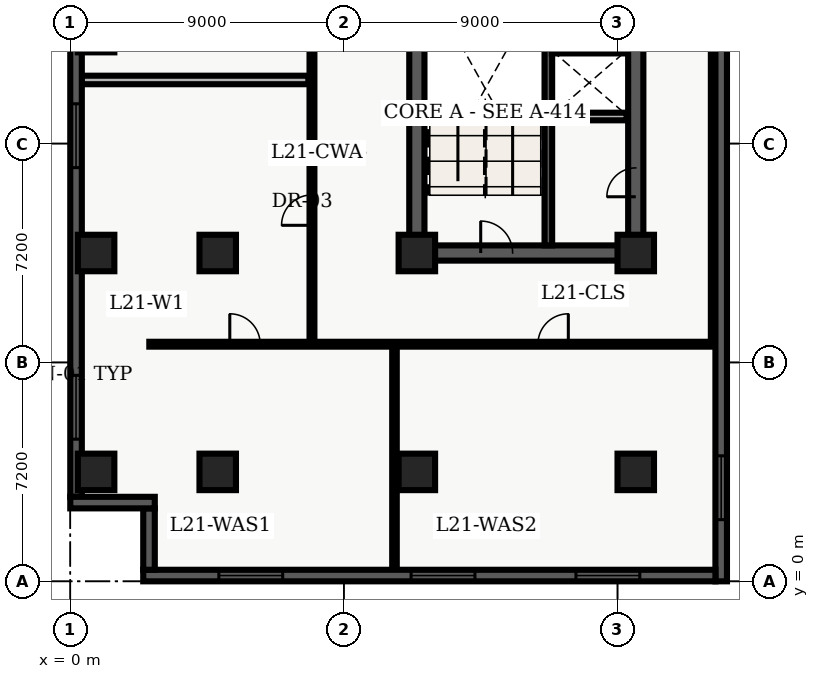
"""IFC4 building model, lengths in metres.
Left out: names, types, materials, properties, quantities, classifications, styles, units other than length and angle.
Written with IfcOpenShell. Run it as: python <this file> out.ifc"""

import sys

from ifc_helpers import new_model, entity, si_unit, converted_unit, direction, frame, origin_with_axes, origin_2d_with_axis, place, context, subcontext, project, spatial, polyline, rectangle, outline, extrude, element, fill, save


model = new_model("IFC4")
c1 = context("Model", 3, precision=1e-05, world=origin_with_axes(), true_north=direction((0.0, 1.0)))
c2 = subcontext(c1, "Body", "Model", "MODEL_VIEW")
j1 = project(units=[si_unit("LENGTHUNIT", "METRE"), converted_unit("PLANEANGLEUNIT", "DEGREE", entity("IfcPlaneAngleMeasure", 0.017), si_unit("PLANEANGLEUNIT", "RADIAN"), dimensions=[0, 0, 0, 0, 0, 0, 0])], contexts=[c1])
p1 = place(None, origin_with_axes())
s1 = spatial("IfcSite", under=j1, at=p1, CompositionType="ELEMENT")
p2 = place(p1, origin_with_axes())
s2 = spatial("IfcBuilding", under=s1, at=p2, CompositionType="ELEMENT")
p3 = place(p2, frame((0.0, 0.0, 89.1), z_axis=(0.0, 0.0, 1.0), x_axis=(1.0, 0.0, 0.0)))
s3 = spatial("IfcBuildingStorey", under=s2, at=p3, CompositionType="ELEMENT", Elevation=89.1)
p4 = place(p3, frame((11.4, 10.8, 0.0), z_axis=(0.0, 0.0, 1.0), x_axis=(0.0, 1.0, 0.0)))
e1 = element("IfcWall", 1, at=p4, inside=s3, PredefinedType="SHEAR", context=c2, shape_type="SweptSolid", body=[
    extrude(outline(polyline([(0.0, -0.25), (27.0, -0.25), (27.0, 0.25), (0.0, 0.25), (0.0, -0.25)])), origin_with_axes(), (0.0, 0.0, 1.0), 3.66),
])
p5 = place(p3, frame((11.4, 10.8, 0.0), z_axis=(0.0, 0.0, 1.0), x_axis=(1.0, 0.0, 0.0)))
e2 = element("IfcWall", 2, at=p5, inside=s3, PredefinedType="SHEAR", context=c2, shape_type="SweptSolid", body=[
    extrude(outline(polyline([(0.0, -0.25), (7.2, -0.25), (7.2, 0.25), (0.0, 0.25), (0.0, -0.25)])), origin_with_axes(), (0.0, 0.0, 1.0), 3.66),
])
p6 = place(p5, frame((2.625, 0.0, 0.0), z_axis=(0.0, 0.0, 1.0), x_axis=(1.0, 0.0, 0.0)))
e3 = element("IfcOpeningElement", 3, at=p6, cuts=e2, PredefinedType="OPENING", context=c2, shape_type="SweptSolid", body=[
    extrude(rectangle(XDim=1.05, YDim=0.52, at=origin_2d_with_axis()), origin_with_axes(), (0.0, 0.0, 1.0), 2.15),
])
p7 = place(p3, frame((18.6, 10.8, 0.0), z_axis=(0.0, 0.0, 1.0), x_axis=(0.0, 1.0, 0.0)))
e4 = element("IfcWall", 4, at=p7, inside=s3, PredefinedType="SHEAR", context=c2, shape_type="SweptSolid", body=[
    extrude(outline(polyline([(0.0, -0.25), (13.5, -0.25), (13.5, 0.25), (0.0, 0.25), (0.0, -0.25)])), origin_with_axes(), (0.0, 0.0, 1.0), 3.66),
])
p8 = place(p7, frame((11.125, 0.0, 0.0), z_axis=(0.0, 0.0, 1.0), x_axis=(1.0, 0.0, 0.0)))
e5 = element("IfcOpeningElement", 5, at=p8, cuts=e4, PredefinedType="OPENING", context=c2, shape_type="SweptSolid", body=[
    extrude(rectangle(XDim=1.05, YDim=0.52, at=origin_2d_with_axis()), origin_with_axes(), (0.0, 0.0, 1.0), 2.15),
])
p9 = place(p7, frame((2.325, 0.0, 0.0), z_axis=(0.0, 0.0, 1.0), x_axis=(1.0, 0.0, 0.0)))
e6 = element("IfcOpeningElement", 6, at=p9, cuts=e4, PredefinedType="OPENING", context=c2, shape_type="SweptSolid", body=[
    extrude(rectangle(XDim=0.95, YDim=0.52, at=origin_2d_with_axis()), origin_with_axes(), (0.0, 0.0, 1.0), 2.15),
])
p10 = place(p3, frame((15.725, 11.05, 0.0), z_axis=(0.0, 0.0, 1.0), x_axis=(0.0, 1.0, 0.0)))
e7 = element("IfcWall", 7, at=p10, inside=s3, PredefinedType="SHEAR", context=c2, shape_type="SweptSolid", body=[
    extrude(outline(polyline([(0.0, -0.125), (8.65, -0.125), (8.65, 0.125), (0.0, 0.125), (0.0, -0.125)])), origin_with_axes(), (0.0, 0.0, 1.0), 3.66),
])
for number, where, z_axis, x_axis in (
    (8, (11.4, 3.6, 0.0), (0.0, 0.0, 1.0), (1.0, 0.0, 0.0)),
    (9, (11.4, 10.8, 0.0), (0.0, 0.0, 1.0), (1.0, 0.0, 0.0)),
    (10, (18.6, 3.6, 0.0), (0.0, 0.0, 1.0), (1.0, 0.0, 0.0)),
    (11, (18.6, 10.8, 0.0), (0.0, 0.0, 1.0), (1.0, 0.0, 0.0)),
    (12, (4.85, 3.6, 0.0), (0.0, 0.0, 1.0), (1.0, 0.0, 0.0)),
    (13, (4.85, 10.8, 0.0), (0.0, 0.0, 1.0), (1.0, 0.0, 0.0)),
    (14, (0.85, 3.6, 0.0), (0.0, 0.0, 1.0), (1.0, 0.0, 0.0)),
    (15, (0.85, 10.8, 0.0), (0.0, 0.0, 1.0), (1.0, 0.0, 0.0)),
    (16, (0.85, 18.0, 0.0), (0.0, 0.0, 1.0), (1.0, 0.0, 0.0)),
):
    element("IfcColumn", number, at=place(p3, frame(where, z_axis=z_axis, x_axis=x_axis)), inside=s3, PredefinedType="COLUMN", context=c2, shape_type="SweptSolid", body=[
        extrude(rectangle(XDim=1.2, YDim=1.2, at=origin_2d_with_axis()), origin_with_axes(), (0.0, 0.0, 1.0), 3.9),
    ])
for number, where, z_axis, x_axis in (
    (17, (15.84, 15.29, 0.0), (0.0, 0.0, 1.0), (1.0, 0.0, 0.0)),
    (18, (15.84, 17.49, 0.0), (0.0, 0.0, 1.0), (1.0, 0.0, 0.0)),
):
    element("IfcWall", number, at=place(p3, frame(where, z_axis=z_axis, x_axis=x_axis)), inside=s3, PredefinedType="SOLIDWALL", context=c2, shape_type="SweptSolid", body=[
        extrude(outline(polyline([(0.0, -0.125), (2.46, -0.125), (2.46, 0.125), (0.0, 0.125), (0.0, -0.125)])), origin_with_axes(), (0.0, 0.0, 1.0), 2.7),
    ])
p11 = place(p3, frame((2.6, 7.8, 0.0), z_axis=(0.0, 0.0, 1.0), x_axis=(1.0, 0.0, 0.0)))
e19 = element("IfcWall", 19, at=p11, inside=s3, PredefinedType="PARTITIONING", context=c2, shape_type="SweptSolid", body=[
    extrude(outline(polyline([(0.0, -0.08), (18.625, -0.08), (18.625, 0.08), (0.0, 0.08), (0.0, -0.08)])), origin_with_axes(), (0.0, 0.0, 1.0), 2.7),
])
p12 = place(p11, frame((3.147, 0.0, 0.0), z_axis=(0.0, 0.0, 1.0), x_axis=(1.0, 0.0, 0.0)))
e20 = element("IfcOpeningElement", 20, at=p12, cuts=e19, PredefinedType="OPENING", context=c2, shape_type="SweptSolid", body=[
    extrude(rectangle(XDim=1.0, YDim=0.18, at=origin_2d_with_axis()), origin_with_axes(), (0.0, 0.0, 1.0), 2.15),
])
p13 = place(p11, frame((13.282, 0.0, 0.0), z_axis=(0.0, 0.0, 1.0), x_axis=(1.0, 0.0, 0.0)))
e21 = element("IfcOpeningElement", 21, at=p13, cuts=e19, PredefinedType="OPENING", context=c2, shape_type="SweptSolid", body=[
    extrude(rectangle(XDim=1.0, YDim=0.18, at=origin_2d_with_axis()), origin_with_axes(), (0.0, 0.0, 1.0), 2.15),
])
p14 = place(p3, frame((21.15, 7.8, 0.0), z_axis=(0.0, 0.0, 1.0), x_axis=(0.0, 1.0, 0.0)))
e22 = element("IfcWall", 22, at=p14, inside=s3, PredefinedType="PARTITIONING", context=c2, shape_type="SweptSolid", body=[
    extrude(outline(polyline([(0.0, -0.08), (32.7, -0.08), (32.7, 0.08), (0.0, 0.08), (0.0, -0.08)])), origin_with_axes(), (0.0, 0.0, 1.0), 2.7),
])
p15 = place(p3, frame((7.95, 7.8, 0.0), z_axis=(0.0, 0.0, 1.0), x_axis=(0.0, 1.0, 0.0)))
e23 = element("IfcWall", 23, at=p15, inside=s3, PredefinedType="PARTITIONING", context=c2, shape_type="SweptSolid", body=[
    extrude(outline(polyline([(0.0, -0.08), (32.7, -0.08), (32.7, 0.08), (0.0, 0.08), (0.0, -0.08)])), origin_with_axes(), (0.0, 0.0, 1.0), 2.7),
])
p16 = place(p15, frame((4.411, 0.0, 0.0), z_axis=(0.0, 0.0, 1.0), x_axis=(1.0, 0.0, 0.0)))
e24 = element("IfcOpeningElement", 24, at=p16, cuts=e23, PredefinedType="OPENING", context=c2, shape_type="SweptSolid", body=[
    extrude(rectangle(XDim=1.0, YDim=0.18, at=origin_2d_with_axis()), origin_with_axes(), (0.0, 0.0, 1.0), 2.15),
])
p17 = place(p15, frame((14.06, 0.0, 0.0), z_axis=(0.0, 0.0, 1.0), x_axis=(1.0, 0.0, 0.0)))
e25 = element("IfcOpeningElement", 25, at=p17, cuts=e23, PredefinedType="OPENING", context=c2, shape_type="SweptSolid", body=[
    extrude(rectangle(XDim=1.0, YDim=0.18, at=origin_2d_with_axis()), origin_with_axes(), (0.0, 0.0, 1.0), 2.15),
])
p18 = place(p15, frame((26.0, 0.0, 0.0), z_axis=(0.0, 0.0, 1.0), x_axis=(1.0, 0.0, 0.0)))
e26 = element("IfcOpeningElement", 26, at=p18, cuts=e23, PredefinedType="OPENING", context=c2, shape_type="SweptSolid", body=[
    extrude(rectangle(XDim=1.0, YDim=0.18, at=origin_2d_with_axis()), origin_with_axes(), (0.0, 0.0, 1.0), 2.15),
])
p19 = place(p3, frame((0.375, 16.492, 0.0), z_axis=(0.0, 0.0, 1.0), x_axis=(1.0, 0.0, 0.0)))
e27 = element("IfcWall", 27, at=p19, inside=s3, PredefinedType="PARTITIONING", context=c2, shape_type="SweptSolid", body=[
    extrude(outline(polyline([(0.0, -0.14), (7.455, -0.14), (7.455, 0.14), (0.0, 0.14), (0.0, -0.14)])), origin_with_axes(), (0.0, 0.0, 1.0), 2.7),
])
p20 = place(p3, frame((10.664, 0.36, 0.0), z_axis=(0.0, 0.0, 1.0), x_axis=(0.0, 1.0, 0.0)))
e28 = element("IfcWall", 28, at=p20, inside=s3, PredefinedType="PARTITIONING", context=c2, shape_type="SweptSolid", body=[
    extrude(outline(polyline([(0.0, -0.075), (7.34, -0.075), (7.34, 0.075), (0.0, 0.075), (0.0, -0.075)])), origin_with_axes(), (0.0, 0.0, 1.0), 2.7),
])
p21 = place(p3, frame((0.19, 2.78, 0.0), z_axis=(0.0, 0.0, 1.0), x_axis=(0.0, 1.0, 0.0)))
e29 = element("IfcWall", 29, at=p21, inside=s3, PredefinedType="SOLIDWALL", context=c2, shape_type="SweptSolid", body=[
    extrude(outline(polyline([(0.0, -0.19), (43.42, -0.19), (43.42, 0.19), (0.0, 0.19), (0.0, -0.19)])), origin_with_axes(), (0.0, 0.0, 1.0), 3.66),
])
p22 = place(p21, frame((2.946, 0.0, 0.45), z_axis=(0.0, 0.0, 1.0), x_axis=(1.0, 0.0, 0.0)))
e30 = element("IfcOpeningElement", 30, at=p22, cuts=e29, PredefinedType="OPENING", context=c2, shape_type="SweptSolid", body=[
    extrude(rectangle(XDim=2.1, YDim=0.4, at=origin_2d_with_axis()), origin_with_axes(), (0.0, 0.0, 1.0), 2.2),
])
p23 = place(p21, frame((11.878, 0.0, 0.45), z_axis=(0.0, 0.0, 1.0), x_axis=(1.0, 0.0, 0.0)))
e31 = element("IfcOpeningElement", 31, at=p23, cuts=e29, PredefinedType="OPENING", context=c2, shape_type="SweptSolid", body=[
    extrude(rectangle(XDim=2.1, YDim=0.4, at=origin_2d_with_axis()), origin_with_axes(), (0.0, 0.0, 1.0), 2.2),
])
p24 = place(p21, frame((17.469, 0.0, 0.45), z_axis=(0.0, 0.0, 1.0), x_axis=(1.0, 0.0, 0.0)))
e32 = element("IfcOpeningElement", 32, at=p24, cuts=e29, PredefinedType="OPENING", context=c2, shape_type="SweptSolid", body=[
    extrude(rectangle(XDim=2.1, YDim=0.4, at=origin_2d_with_axis()), origin_with_axes(), (0.0, 0.0, 1.0), 2.2),
])
p25 = place(p21, frame((21.71, 0.0, 0.45), z_axis=(0.0, 0.0, 1.0), x_axis=(1.0, 0.0, 0.0)))
e33 = element("IfcOpeningElement", 33, at=p25, cuts=e29, PredefinedType="OPENING", context=c2, shape_type="SweptSolid", body=[
    extrude(rectangle(XDim=2.1, YDim=0.4, at=origin_2d_with_axis()), origin_with_axes(), (0.0, 0.0, 1.0), 2.2),
])
p26 = place(p21, frame((26.401, 0.0, 0.45), z_axis=(0.0, 0.0, 1.0), x_axis=(1.0, 0.0, 0.0)))
e34 = element("IfcOpeningElement", 34, at=p26, cuts=e29, PredefinedType="OPENING", context=c2, shape_type="SweptSolid", body=[
    extrude(rectangle(XDim=2.1, YDim=0.4, at=origin_2d_with_axis()), origin_with_axes(), (0.0, 0.0, 1.0), 2.2),
])
p27 = place(p21, frame((31.092, 0.0, 0.45), z_axis=(0.0, 0.0, 1.0), x_axis=(1.0, 0.0, 0.0)))
e35 = element("IfcOpeningElement", 35, at=p27, cuts=e29, PredefinedType="OPENING", context=c2, shape_type="SweptSolid", body=[
    extrude(rectangle(XDim=2.1, YDim=0.4, at=origin_2d_with_axis()), origin_with_axes(), (0.0, 0.0, 1.0), 2.2),
])
p28 = place(p21, frame((40.024, 0.0, 0.45), z_axis=(0.0, 0.0, 1.0), x_axis=(1.0, 0.0, 0.0)))
e36 = element("IfcOpeningElement", 36, at=p28, cuts=e29, PredefinedType="OPENING", context=c2, shape_type="SweptSolid", body=[
    extrude(rectangle(XDim=2.1, YDim=0.4, at=origin_2d_with_axis()), origin_with_axes(), (0.0, 0.0, 1.0), 2.2),
])
p29 = place(p3, frame((21.41, 45.82, 0.0), z_axis=(0.0, 0.0, 1.0), x_axis=(0.0, -1.0, 0.0)))
e37 = element("IfcWall", 37, at=p29, inside=s3, PredefinedType="SOLIDWALL", context=c2, shape_type="SweptSolid", body=[
    extrude(outline(polyline([(0.0, -0.19), (45.82, -0.19), (45.82, 0.19), (0.0, 0.19), (0.0, -0.19)])), origin_with_axes(), (0.0, 0.0, 1.0), 3.66),
])
p30 = place(p29, frame((3.079, 0.0, 0.45), z_axis=(0.0, 0.0, 1.0), x_axis=(1.0, 0.0, 0.0)))
e38 = element("IfcOpeningElement", 38, at=p30, cuts=e37, PredefinedType="OPENING", context=c2, shape_type="SweptSolid", body=[
    extrude(rectangle(XDim=2.1, YDim=0.4, at=origin_2d_with_axis()), origin_with_axes(), (0.0, 0.0, 1.0), 2.2),
])
p31 = place(p29, frame((42.741, 0.0, 0.45), z_axis=(0.0, 0.0, 1.0), x_axis=(1.0, 0.0, 0.0)))
e39 = element("IfcOpeningElement", 39, at=p31, cuts=e37, PredefinedType="OPENING", context=c2, shape_type="SweptSolid", body=[
    extrude(rectangle(XDim=2.1, YDim=0.4, at=origin_2d_with_axis()), origin_with_axes(), (0.0, 0.0, 1.0), 2.2),
])
p32 = place(p3, frame((21.22, 0.19, 0.0), z_axis=(0.0, 0.0, 1.0), x_axis=(-1.0, 0.0, 0.0)))
e40 = element("IfcWall", 40, at=p32, inside=s3, PredefinedType="SOLIDWALL", context=c2, shape_type="SweptSolid", body=[
    extrude(outline(polyline([(0.0, -0.19), (18.82, -0.19), (18.82, 0.19), (0.0, 0.19), (0.0, -0.19)])), origin_with_axes(), (0.0, 0.0, 1.0), 3.66),
])
p33 = place(p32, frame((3.537, 0.0, 0.45), z_axis=(0.0, 0.0, 1.0), x_axis=(1.0, 0.0, 0.0)))
e41 = element("IfcOpeningElement", 41, at=p33, cuts=e40, PredefinedType="OPENING", context=c2, shape_type="SweptSolid", body=[
    extrude(rectangle(XDim=2.1, YDim=0.4, at=origin_2d_with_axis()), origin_with_axes(), (0.0, 0.0, 1.0), 2.2),
])
p34 = place(p32, frame((8.96, 0.0, 0.45), z_axis=(0.0, 0.0, 1.0), x_axis=(1.0, 0.0, 0.0)))
e42 = element("IfcOpeningElement", 42, at=p34, cuts=e40, PredefinedType="OPENING", context=c2, shape_type="SweptSolid", body=[
    extrude(rectangle(XDim=2.1, YDim=0.4, at=origin_2d_with_axis()), origin_with_axes(), (0.0, 0.0, 1.0), 2.2),
])
p35 = place(p32, frame((15.283, 0.0, 0.45), z_axis=(0.0, 0.0, 1.0), x_axis=(1.0, 0.0, 0.0)))
e43 = element("IfcOpeningElement", 43, at=p35, cuts=e40, PredefinedType="OPENING", context=c2, shape_type="SweptSolid", body=[
    extrude(rectangle(XDim=2.1, YDim=0.4, at=origin_2d_with_axis()), origin_with_axes(), (0.0, 0.0, 1.0), 2.2),
])
p36 = place(p3, frame((2.59, 0.38, 0.0), z_axis=(0.0, 0.0, 1.0), x_axis=(0.0, 1.0, 0.0)))
e44 = element("IfcWall", 44, at=p36, inside=s3, PredefinedType="SOLIDWALL", context=c2, shape_type="SweptSolid", body=[
    extrude(outline(polyline([(0.0, -0.19), (2.02, -0.19), (2.02, 0.19), (0.0, 0.19), (0.0, -0.19)])), origin_with_axes(), (0.0, 0.0, 1.0), 3.66),
])
p37 = place(p3, frame((2.78, 2.59, 0.0), z_axis=(0.0, 0.0, 1.0), x_axis=(-1.0, 0.0, 0.0)))
e45 = element("IfcWall", 45, at=p37, inside=s3, PredefinedType="SOLIDWALL", context=c2, shape_type="SweptSolid", body=[
    extrude(outline(polyline([(0.0, -0.19), (2.78, -0.19), (2.78, 0.19), (0.0, 0.19), (0.0, -0.19)])), origin_with_axes(), (0.0, 0.0, 1.0), 3.66),
])
p38 = place(p5, frame((2.625, 0.0, 0.0), z_axis=(0.0, 0.0, 1.0), x_axis=(1.0, 0.0, 0.0)))
e46 = element("IfcDoor", 46, at=p38, inside=s3, OperationType="SINGLE_SWING_LEFT", PredefinedType="DOOR", context=c2, shape_type="SweptSolid", body=[
    extrude(rectangle(XDim=1.05, YDim=0.09, at=origin_2d_with_axis()), origin_with_axes(), (0.0, 0.0, 1.0), 2.15),
])
fill(e3, e46)
p39 = place(p7, frame((2.325, 0.0, 0.0), z_axis=(0.0, 0.0, 1.0), x_axis=(1.0, 0.0, 0.0)))
e47 = element("IfcDoor", 47, at=p39, inside=s3, OperationType="SINGLE_SWING_LEFT", PredefinedType="DOOR", context=c2, shape_type="SweptSolid", body=[
    extrude(rectangle(XDim=0.95, YDim=0.09, at=origin_2d_with_axis()), origin_with_axes(), (0.0, 0.0, 1.0), 2.15),
])
fill(e6, e47)
p40 = place(p15, frame((4.411, 0.0, 0.0), z_axis=(0.0, 0.0, 1.0), x_axis=(1.0, 0.0, 0.0)))
e48 = element("IfcDoor", 48, at=p40, inside=s3, OperationType="SINGLE_SWING_LEFT", PredefinedType="DOOR", context=c2, shape_type="SweptSolid", body=[
    extrude(rectangle(XDim=1.0, YDim=0.09, at=origin_2d_with_axis()), origin_with_axes(), (0.0, 0.0, 1.0), 2.15),
])
fill(e24, e48)
p41 = place(p11, frame((3.147, 0.0, 0.0), z_axis=(0.0, 0.0, 1.0), x_axis=(1.0, 0.0, 0.0)))
e49 = element("IfcDoor", 49, at=p41, inside=s3, OperationType="SINGLE_SWING_LEFT", PredefinedType="DOOR", context=c2, shape_type="SweptSolid", body=[
    extrude(rectangle(XDim=1.0, YDim=0.09, at=origin_2d_with_axis()), origin_with_axes(), (0.0, 0.0, 1.0), 2.15),
])
fill(e20, e49)
p42 = place(p11, frame((13.282, 0.0, 0.0), z_axis=(0.0, 0.0, 1.0), x_axis=(1.0, 0.0, 0.0)))
e50 = element("IfcDoor", 50, at=p42, inside=s3, OperationType="SINGLE_SWING_RIGHT", PredefinedType="DOOR", context=c2, shape_type="SweptSolid", body=[
    extrude(rectangle(XDim=1.0, YDim=0.09, at=origin_2d_with_axis()), origin_with_axes(), (0.0, 0.0, 1.0), 2.15),
])
fill(e21, e50)
p43 = place(p21, frame((2.946, 0.0, 0.45), z_axis=(0.0, 0.0, 1.0), x_axis=(1.0, 0.0, 0.0)))
e51 = element("IfcWindow", 51, at=p43, inside=s3, PredefinedType="WINDOW", context=c2, shape_type="SweptSolid", body=[
    extrude(rectangle(XDim=2.1, YDim=0.09, at=origin_2d_with_axis()), origin_with_axes(), (0.0, 0.0, 1.0), 2.2),
])
fill(e30, e51)
p44 = place(p21, frame((11.878, 0.0, 0.45), z_axis=(0.0, 0.0, 1.0), x_axis=(1.0, 0.0, 0.0)))
e52 = element("IfcWindow", 52, at=p44, inside=s3, PredefinedType="WINDOW", context=c2, shape_type="SweptSolid", body=[
    extrude(rectangle(XDim=2.1, YDim=0.09, at=origin_2d_with_axis()), origin_with_axes(), (0.0, 0.0, 1.0), 2.2),
])
fill(e31, e52)
p45 = place(p29, frame((42.741, 0.0, 0.45), z_axis=(0.0, 0.0, 1.0), x_axis=(1.0, 0.0, 0.0)))
e53 = element("IfcWindow", 53, at=p45, inside=s3, PredefinedType="WINDOW", context=c2, shape_type="SweptSolid", body=[
    extrude(rectangle(XDim=2.1, YDim=0.09, at=origin_2d_with_axis()), origin_with_axes(), (0.0, 0.0, 1.0), 2.2),
])
fill(e39, e53)
p46 = place(p32, frame((3.537, 0.0, 0.45), z_axis=(0.0, 0.0, 1.0), x_axis=(1.0, 0.0, 0.0)))
e54 = element("IfcWindow", 54, at=p46, inside=s3, PredefinedType="WINDOW", context=c2, shape_type="SweptSolid", body=[
    extrude(rectangle(XDim=2.1, YDim=0.09, at=origin_2d_with_axis()), origin_with_axes(), (0.0, 0.0, 1.0), 2.2),
])
fill(e41, e54)
p47 = place(p32, frame((8.96, 0.0, 0.45), z_axis=(0.0, 0.0, 1.0), x_axis=(1.0, 0.0, 0.0)))
e55 = element("IfcWindow", 55, at=p47, inside=s3, PredefinedType="WINDOW", context=c2, shape_type="SweptSolid", body=[
    extrude(rectangle(XDim=2.1, YDim=0.09, at=origin_2d_with_axis()), origin_with_axes(), (0.0, 0.0, 1.0), 2.2),
])
fill(e42, e55)
p48 = place(p32, frame((15.283, 0.0, 0.45), z_axis=(0.0, 0.0, 1.0), x_axis=(1.0, 0.0, 0.0)))
e56 = element("IfcWindow", 56, at=p48, inside=s3, PredefinedType="WINDOW", context=c2, shape_type="SweptSolid", body=[
    extrude(rectangle(XDim=2.1, YDim=0.09, at=origin_2d_with_axis()), origin_with_axes(), (0.0, 0.0, 1.0), 2.2),
])
fill(e43, e56)
save(model, sys.argv[1])
